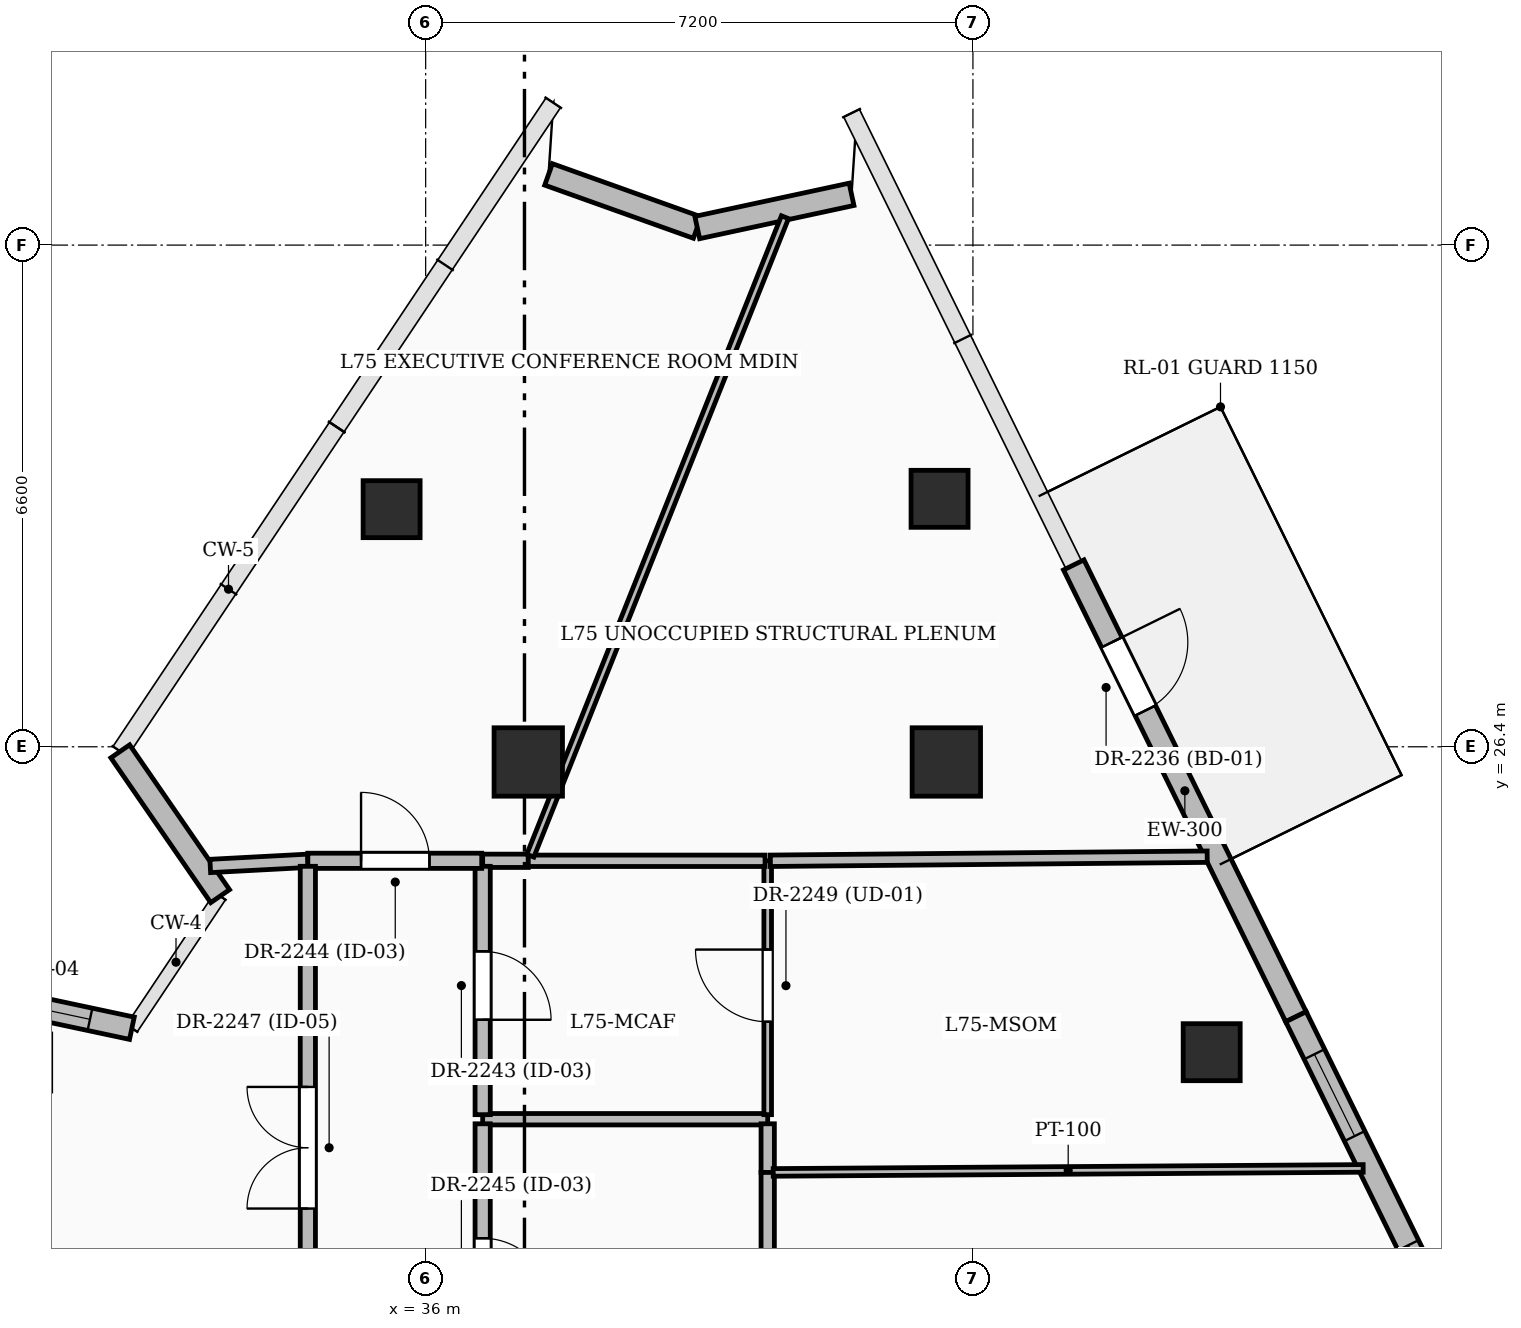
"""IFC4 building model, lengths in metres.
Left out: names, types, materials, properties, quantities, classifications, styles, units other than length and angle.
Written with IfcOpenShell. Run it as: python <this file> out.ifc"""

import sys

from ifc_helpers import new_model, si_unit, direction, frame, frame_2d, origin, origin_2d, place, context, subcontext, project, spatial, rectangle, extrude, element, fill, save


model = new_model("IFC4")
c1 = context("Model", 3, precision=1e-05, world=origin(), true_north=direction((0.0, 1.0)))
c2 = subcontext(c1, "Body", "Model", "MODEL_VIEW")
j1 = project(units=[si_unit("LENGTHUNIT", "METRE"), si_unit("PLANEANGLEUNIT", "RADIAN")], contexts=[c1])
p1 = place(None, origin())
s1 = spatial("IfcSite", under=j1, at=p1, CompositionType="ELEMENT")
p2 = place(p1, origin())
s2 = spatial("IfcBuilding", under=s1, at=p2, CompositionType="ELEMENT")
p3 = place(p2, frame((0.0, 0.0, 289.5)))
s3 = spatial("IfcBuildingStorey", under=s2, at=p3, CompositionType="ELEMENT", Elevation=289.5)
for number, where, z_axis, x_axis in (
    (1, (42.85, 26.2, 0.0), (0.0, 0.0, 1.0), (1.0, 0.0, 0.0)),
    (2, (37.35, 26.2, 0.0), (0.0, 0.0, 1.0), (1.0, 0.0, 0.0)),
):
    element("IfcColumn", number, at=place(p3, frame(where, z_axis=z_axis, x_axis=x_axis)), inside=s3, PredefinedType="COLUMN", context=c2, shape_type="SweptSolid", body=[
        extrude(rectangle(XDim=0.9, YDim=0.9, at=origin_2d()), origin(), (0.0, 0.0, 1.0), 4.5),
    ])
for number, where, z_axis, x_axis in (
    (3, (46.341, 22.382, 0.0), (0.0, 0.0, 1.0), (1.0, 0.0, 0.0)),
    (4, (42.761, 29.662, 0.0), (0.0, 0.0, 1.0), (1.0, 0.0, 0.0)),
    (5, (35.552, 29.526, 0.0), (0.0, 0.0, 1.0), (1.0, 0.0, 0.0)),
):
    element("IfcColumn", number, at=place(p3, frame(where, z_axis=z_axis, x_axis=x_axis)), inside=s3, PredefinedType="COLUMN", context=c2, shape_type="SweptSolid", body=[
        extrude(rectangle(XDim=0.75, YDim=0.75, at=origin_2d()), origin(), (0.0, 0.0, 1.0), 4.5),
    ])
p4 = place(p3, frame((29.872, 23.179, 0.0), z_axis=(0.0, 0.0, 1.0), x_axis=(0.978065695184, -0.208296653608, 0.0)))
e6 = element("IfcWall", 6, at=p4, inside=s3, PredefinedType="SOLIDWALL", context=c2, shape_type="SweptSolid", body=[
    extrude(rectangle(XDim=2.314, YDim=0.3, at=frame_2d((1.157, 0.0))), origin(), (0.0, 0.0, 1.0), 3.396),
])
p5 = place(p4, frame((0.55, 0.0, 0.8)))
e7 = element("IfcOpeningElement", 7, at=p5, cuts=e6, PredefinedType="OPENING", context=c2, shape_type="SweptSolid", body=[
    extrude(rectangle(XDim=1.2, YDim=1.8, at=frame_2d((0.6, 0.9))), frame((0.0, 0.16, 0.0), z_axis=(0.0, -1.0, 0.0), x_axis=(1.0, 0.0, 0.0)), (0.0, 0.0, 1.0), 0.32),
])
p6 = place(p3, frame((33.296, 24.435, 0.0), z_axis=(0.0, 0.0, 1.0), x_axis=(-0.567777329438, 0.823182181644, 0.0)))
e8 = element("IfcWall", 8, at=p6, inside=s3, PredefinedType="SOLIDWALL", context=c2, shape_type="SweptSolid", body=[
    extrude(rectangle(XDim=2.314, YDim=0.3, at=frame_2d((1.157, 0.0))), origin(), (0.0, 0.0, 1.0), 3.396),
])
p7 = place(p3, frame((37.617, 33.93, 0.0), z_axis=(0.0, 0.0, 1.0), x_axis=(0.941683396202, -0.336500195123, 0.0)))
e9 = element("IfcWall", 9, at=p7, inside=s3, PredefinedType="SOLIDWALL", context=c2, shape_type="SweptSolid", body=[
    extrude(rectangle(XDim=2.077, YDim=0.3, at=frame_2d((1.039, 0.0))), origin(), (0.0, 0.0, 1.0), 4.2),
])
p8 = place(p3, frame((39.573, 33.231, 0.0), z_axis=(0.0, 0.0, 1.0), x_axis=(0.977604114456, 0.210452358975, 0.0)))
e10 = element("IfcWall", 10, at=p8, inside=s3, PredefinedType="SOLIDWALL", context=c2, shape_type="SweptSolid", body=[
    extrude(rectangle(XDim=2.076, YDim=0.3, at=frame_2d((1.038, 0.0))), origin(), (0.0, 0.0, 1.0), 4.2),
])
p9 = place(p3, frame((44.526, 28.792, 0.0), z_axis=(0.0, 0.0, 1.0), x_axis=(0.441321601589, -0.89734900901, 0.0)))
e11 = element("IfcWall", 11, at=p9, inside=s3, PredefinedType="SOLIDWALL", context=c2, shape_type="SweptSolid", body=[
    extrude(rectangle(XDim=6.624, YDim=0.3, at=frame_2d((3.312, 0.0))), origin(), (0.0, 0.0, 1.0), 4.2),
])
p10 = place(p9, frame((1.135, 0.0, 0.0)))
e12 = element("IfcOpeningElement", 12, at=p10, cuts=e11, PredefinedType="OPENING", context=c2, shape_type="SweptSolid", body=[
    extrude(rectangle(XDim=1.0, YDim=2.2, at=frame_2d((0.5, 1.1))), frame((0.0, 0.16, 0.0), z_axis=(0.0, -1.0, 0.0), x_axis=(1.0, 0.0, 0.0)), (0.0, 0.0, 1.0), 0.32),
])
p11 = place(p3, frame((47.45, 22.848, 0.0), z_axis=(0.0, 0.0, 1.0), x_axis=(0.441291922586, -0.897363604711, 0.0)))
e13 = element("IfcWall", 13, at=p11, inside=s3, PredefinedType="SOLIDWALL", context=c2, shape_type="SweptSolid", body=[
    extrude(rectangle(XDim=6.624, YDim=0.3, at=frame_2d((3.312, 0.0))), origin(), (0.0, 0.0, 1.0), 4.2),
])
p12 = place(p11, frame((0.55, 0.0, 0.8)))
e14 = element("IfcOpeningElement", 14, at=p12, cuts=e13, PredefinedType="OPENING", context=c2, shape_type="SweptSolid", body=[
    extrude(rectangle(XDim=1.2, YDim=1.8, at=frame_2d((0.6, 0.9))), frame((0.0, 0.16, 0.0), z_axis=(0.0, -1.0, 0.0), x_axis=(1.0, 0.0, 0.0)), (0.0, 0.0, 1.0), 0.32),
])
p13 = place(p11, frame((3.35, 0.0, 0.55)))
e15 = element("IfcOpeningElement", 15, at=p13, cuts=e13, PredefinedType="OPENING", context=c2, shape_type="SweptSolid", body=[
    extrude(rectangle(XDim=1.6, YDim=2.2, at=frame_2d((0.8, 1.1))), frame((0.0, 0.16, 0.0), z_axis=(0.0, -1.0, 0.0), x_axis=(1.0, 0.0, 0.0)), (0.0, 0.0, 1.0), 0.32),
])
p14 = place(p3, frame((36.75, 21.5, 0.0), z_axis=(0.0, 0.0, 1.0), x_axis=(1.0, 0.0, 0.0)))
e16 = element("IfcWall", 16, at=p14, inside=s3, PredefinedType="PARTITIONING", context=c2, shape_type="SweptSolid", body=[
    extrude(rectangle(XDim=3.75, YDim=0.15, at=frame_2d((1.875, 0.0))), origin(), (0.0, 0.0, 1.0), 3.535),
])
p15 = place(p3, frame((40.5, 21.56, 0.0), z_axis=(0.0, 0.0, 1.0), x_axis=(0.0, 1.0, 0.0)))
e17 = element("IfcWall", 17, at=p15, inside=s3, PredefinedType="PARTITIONING", context=c2, shape_type="SweptSolid", body=[
    extrude(rectangle(XDim=3.34, YDim=0.1, at=frame_2d((1.67, 0.0))), origin(), (0.0, 0.0, 1.0), 3.535),
])
p16 = place(p15, frame((1.222, 0.0, 0.0)))
e18 = element("IfcOpeningElement", 18, at=p16, cuts=e17, PredefinedType="OPENING", context=c2, shape_type="SweptSolid", body=[
    extrude(rectangle(XDim=0.95, YDim=2.2, at=frame_2d((0.475, 1.1))), frame((0.0, 0.06, 0.0), z_axis=(0.0, -1.0, 0.0), x_axis=(1.0, 0.0, 0.0)), (0.0, 0.0, 1.0), 0.12),
])
p17 = place(p3, frame((37.35, 24.9, 0.0), z_axis=(0.0, 0.0, 1.0), x_axis=(-1.0, 0.0, 0.0)))
e19 = element("IfcWall", 19, at=p17, inside=s3, PredefinedType="PARTITIONING", context=c2, shape_type="SweptSolid", body=[
    extrude(rectangle(XDim=0.6, YDim=0.175, at=frame_2d((0.3, 0.0))), origin(), (0.0, 0.0, 1.0), 4.2),
])
p18 = place(p3, frame((40.465, 24.9, 0.0), z_axis=(0.0, 0.0, 1.0), x_axis=(-1.0, 0.0, 0.0)))
e20 = element("IfcWall", 20, at=p18, inside=s3, PredefinedType="PARTITIONING", context=c2, shape_type="SweptSolid", body=[
    extrude(rectangle(XDim=3.115, YDim=0.15, at=frame_2d((1.558, 0.0))), origin(), (0.0, 0.0, 1.0), 3.535),
])
p19 = place(p3, frame((36.75, 24.827, 0.0), z_axis=(0.0, 0.0, 1.0), x_axis=(0.0, -1.0, 0.0)))
e21 = element("IfcWall", 21, at=p19, inside=s3, PredefinedType="PARTITIONING", context=c2, shape_type="SweptSolid", body=[
    extrude(rectangle(XDim=3.267, YDim=0.2, at=frame_2d((1.634, 0.0))), origin(), (0.0, 0.0, 1.0), 3.86),
])
p20 = place(p19, frame((1.119, 0.0, 0.0)))
e22 = element("IfcOpeningElement", 22, at=p20, cuts=e21, PredefinedType="OPENING", context=c2, shape_type="SweptSolid", body=[
    extrude(rectangle(XDim=0.9, YDim=2.1, at=frame_2d((0.45, 1.05))), frame((0.0, 0.11, 0.0), z_axis=(0.0, -1.0, 0.0), x_axis=(1.0, 0.0, 0.0)), (0.0, 0.0, 1.0), 0.22),
])
p21 = place(p3, frame((40.5, 20.8, 0.0), z_axis=(0.0, 0.0, 1.0), x_axis=(0.0, 1.0, 0.0)))
e23 = element("IfcWall", 23, at=p21, inside=s3, PredefinedType="PARTITIONING", context=c2, shape_type="SweptSolid", body=[
    extrude(rectangle(XDim=0.64, YDim=0.175, at=frame_2d((0.32, 0.0))), origin(), (0.0, 0.0, 1.0), 4.2),
])
p22 = place(p3, frame((36.75, 21.44, 0.0), z_axis=(0.0, 0.0, 1.0), x_axis=(0.0, -1.0, 0.0)))
e24 = element("IfcWall", 24, at=p22, inside=s3, PredefinedType="PARTITIONING", context=c2, shape_type="SweptSolid", body=[
    extrude(rectangle(XDim=4.09, YDim=0.2, at=frame_2d((2.045, 0.0))), origin(), (0.0, 0.0, 1.0), 3.535),
])
p23 = place(p22, frame((1.506, 0.0, 0.0)))
e25 = element("IfcOpeningElement", 25, at=p23, cuts=e24, PredefinedType="OPENING", context=c2, shape_type="SweptSolid", body=[
    extrude(rectangle(XDim=0.9, YDim=2.1, at=frame_2d((0.45, 1.05))), frame((0.0, 0.11, 0.0), z_axis=(0.0, -1.0, 0.0), x_axis=(1.0, 0.0, 0.0)), (0.0, 0.0, 1.0), 0.22),
])
p24 = place(p3, frame((40.5, 17.435, 0.0), z_axis=(0.0, 0.0, 1.0), x_axis=(0.0, 1.0, 0.0)))
e26 = element("IfcWall", 26, at=p24, inside=s3, PredefinedType="PARTITIONING", context=c2, shape_type="SweptSolid", body=[
    extrude(rectangle(XDim=3.365, YDim=0.175, at=frame_2d((1.683, 0.0))), origin(), (0.0, 0.0, 1.0), 4.2),
])
p25 = place(p3, frame((46.282, 24.954, 0.0), z_axis=(0.0, 0.0, 1.0), x_axis=(-0.999955933057, -0.009387861564, 0.0)))
e27 = element("IfcWall", 27, at=p25, inside=s3, PredefinedType="PARTITIONING", context=c2, shape_type="SweptSolid", body=[
    extrude(rectangle(XDim=5.747, YDim=0.15, at=frame_2d((2.874, 0.0))), origin(), (0.0, 0.0, 1.0), 3.391),
])
p26 = place(p3, frame((40.573, 20.8, 0.0), z_axis=(0.0, 0.0, 1.0), x_axis=(0.999976919028, 0.006794218946, 0.0)))
e28 = element("IfcWall", 28, at=p26, inside=s3, PredefinedType="PARTITIONING", context=c2, shape_type="SweptSolid", body=[
    extrude(rectangle(XDim=7.762, YDim=0.1, at=frame_2d((3.881, 0.0))), origin(), (0.0, 0.0, 1.0), 3.391),
])
p27 = place(p3, frame((37.377, 24.967, 0.0), z_axis=(0.0, 0.0, 1.0), x_axis=(0.370459541778, 0.928848603329, 0.0)))
e29 = element("IfcWall", 29, at=p27, inside=s3, PredefinedType="PARTITIONING", context=c2, shape_type="SweptSolid", body=[
    extrude(rectangle(XDim=9.043, YDim=0.1, at=frame_2d((4.521, 0.0))), origin(), (0.0, 0.0, 1.0), 3.391),
])
p28 = place(p3, frame((33.166, 24.832, 0.0), z_axis=(0.0, 0.0, 1.0), x_axis=(0.998605738501, 0.052788057673, 0.0)))
e30 = element("IfcWall", 30, at=p28, inside=s3, PredefinedType="PARTITIONING", context=c2, shape_type="SweptSolid", body=[
    extrude(rectangle(XDim=1.286, YDim=0.175, at=frame_2d((0.643, 0.0))), origin(), (0.0, 0.0, 1.0), 4.2),
])
p29 = place(p3, frame((34.45, 24.9, 0.0), z_axis=(0.0, 0.0, 1.0), x_axis=(1.0, 0.0, 0.0)))
e31 = element("IfcWall", 31, at=p29, inside=s3, PredefinedType="PARTITIONING", context=c2, shape_type="SweptSolid", body=[
    extrude(rectangle(XDim=2.288, YDim=0.2, at=frame_2d((1.144, 0.0))), origin(), (0.0, 0.0, 1.0), 3.535),
])
p30 = place(p29, frame((0.7, 0.0, 0.0)))
e32 = element("IfcOpeningElement", 32, at=p30, cuts=e31, PredefinedType="OPENING", context=c2, shape_type="SweptSolid", body=[
    extrude(rectangle(XDim=0.9, YDim=2.1, at=frame_2d((0.45, 1.05))), frame((0.0, 0.11, 0.0), z_axis=(0.0, -1.0, 0.0), x_axis=(1.0, 0.0, 0.0)), (0.0, 0.0, 1.0), 0.22),
])
p31 = place(p3, frame((34.45, 17.435, 0.0), z_axis=(0.0, 0.0, 1.0), x_axis=(0.0, 1.0, 0.0)))
e33 = element("IfcWall", 33, at=p31, inside=s3, PredefinedType="PARTITIONING", context=c2, shape_type="SweptSolid", body=[
    extrude(rectangle(XDim=7.392, YDim=0.2, at=frame_2d((3.696, 0.0))), origin(), (0.0, 0.0, 1.0), 3.86),
])
p32 = place(p31, frame((2.89, 0.0, 0.0)))
e34 = element("IfcOpeningElement", 34, at=p32, cuts=e33, PredefinedType="OPENING", context=c2, shape_type="SweptSolid", body=[
    extrude(rectangle(XDim=1.6, YDim=2.3, at=frame_2d((0.8, 1.15))), frame((0.0, 0.11, 0.0), z_axis=(0.0, -1.0, 0.0), x_axis=(1.0, 0.0, 0.0)), (0.0, 0.0, 1.0), 0.22),
])
p33 = place(p5, origin())
e35 = element("IfcWindow", 35, at=p33, inside=s3, PartitioningType="SINGLE_PANEL", PredefinedType="WINDOW", context=c2, shape_type="SweptSolid", body=[
    extrude(rectangle(XDim=1.2, YDim=1.8, at=frame_2d((0.6, 0.9))), frame((0.0, 0.03, 0.0), z_axis=(0.0, -1.0, 0.0), x_axis=(1.0, 0.0, 0.0)), (0.0, 0.0, 1.0), 0.06),
])
fill(e7, e35)
p34 = place(p10, origin())
e36 = element("IfcDoor", 36, at=p34, inside=s3, OperationType="SINGLE_SWING_LEFT", PredefinedType="DOOR", context=c2, shape_type="SweptSolid", body=[
    extrude(rectangle(XDim=1.0, YDim=2.2, at=frame_2d((0.5, 1.1))), frame((0.0, 0.025, 0.0), z_axis=(0.0, -1.0, 0.0), x_axis=(1.0, 0.0, 0.0)), (0.0, 0.0, 1.0), 0.05),
])
fill(e12, e36)
p35 = place(p12, origin())
e37 = element("IfcWindow", 37, at=p35, inside=s3, PartitioningType="SINGLE_PANEL", PredefinedType="WINDOW", context=c2, shape_type="SweptSolid", body=[
    extrude(rectangle(XDim=1.2, YDim=1.8, at=frame_2d((0.6, 0.9))), frame((0.0, 0.03, 0.0), z_axis=(0.0, -1.0, 0.0), x_axis=(1.0, 0.0, 0.0)), (0.0, 0.0, 1.0), 0.06),
])
fill(e14, e37)
p36 = place(p13, origin())
e38 = element("IfcWindow", 38, at=p36, inside=s3, PartitioningType="SINGLE_PANEL", PredefinedType="WINDOW", context=c2, shape_type="SweptSolid", body=[
    extrude(rectangle(XDim=1.6, YDim=2.2, at=frame_2d((0.8, 1.1))), frame((0.0, 0.03, 0.0), z_axis=(0.0, -1.0, 0.0), x_axis=(1.0, 0.0, 0.0)), (0.0, 0.0, 1.0), 0.06),
])
fill(e15, e38)
p37 = place(p20, origin())
e39 = element("IfcDoor", 39, at=p37, inside=s3, OperationType="SINGLE_SWING_RIGHT", PredefinedType="DOOR", context=c2, shape_type="SweptSolid", body=[
    extrude(rectangle(XDim=0.9, YDim=2.1, at=frame_2d((0.45, 1.05))), frame((0.0, 0.025, 0.0), z_axis=(0.0, -1.0, 0.0), x_axis=(1.0, 0.0, 0.0)), (0.0, 0.0, 1.0), 0.05),
])
fill(e22, e39)
p38 = place(p30, origin())
e40 = element("IfcDoor", 40, at=p38, inside=s3, OperationType="SINGLE_SWING_LEFT", PredefinedType="DOOR", context=c2, shape_type="SweptSolid", body=[
    extrude(rectangle(XDim=0.9, YDim=2.1, at=frame_2d((0.45, 1.05))), frame((0.0, 0.025, 0.0), z_axis=(0.0, -1.0, 0.0), x_axis=(1.0, 0.0, 0.0)), (0.0, 0.0, 1.0), 0.05),
])
fill(e32, e40)
p39 = place(p23, origin())
e41 = element("IfcDoor", 41, at=p39, inside=s3, OperationType="SINGLE_SWING_RIGHT", PredefinedType="DOOR", context=c2, shape_type="SweptSolid", body=[
    extrude(rectangle(XDim=0.9, YDim=2.1, at=frame_2d((0.45, 1.05))), frame((0.0, 0.025, 0.0), z_axis=(0.0, -1.0, 0.0), x_axis=(1.0, 0.0, 0.0)), (0.0, 0.0, 1.0), 0.05),
])
fill(e25, e41)
p40 = place(p32, origin())
e42 = element("IfcDoor", 42, at=p40, inside=s3, OperationType="DOUBLE_DOOR_SINGLE_SWING", PredefinedType="DOOR", context=c2, shape_type="SweptSolid", body=[
    extrude(rectangle(XDim=1.6, YDim=2.3, at=frame_2d((0.8, 1.15))), frame((0.0, 0.025, 0.0), z_axis=(0.0, -1.0, 0.0), x_axis=(1.0, 0.0, 0.0)), (0.0, 0.0, 1.0), 0.05),
])
fill(e34, e42)
p41 = place(p16, origin())
e43 = element("IfcDoor", 43, at=p41, inside=s3, OperationType="SINGLE_SWING_RIGHT", PredefinedType="DOOR", context=c2, shape_type="SweptSolid", body=[
    extrude(rectangle(XDim=0.95, YDim=2.2, at=frame_2d((0.475, 1.1))), frame((0.0, 0.025, 0.0), z_axis=(0.0, -1.0, 0.0), x_axis=(1.0, 0.0, 0.0)), (0.0, 0.0, 1.0), 0.05),
])
fill(e18, e43)
save(model, sys.argv[1])
